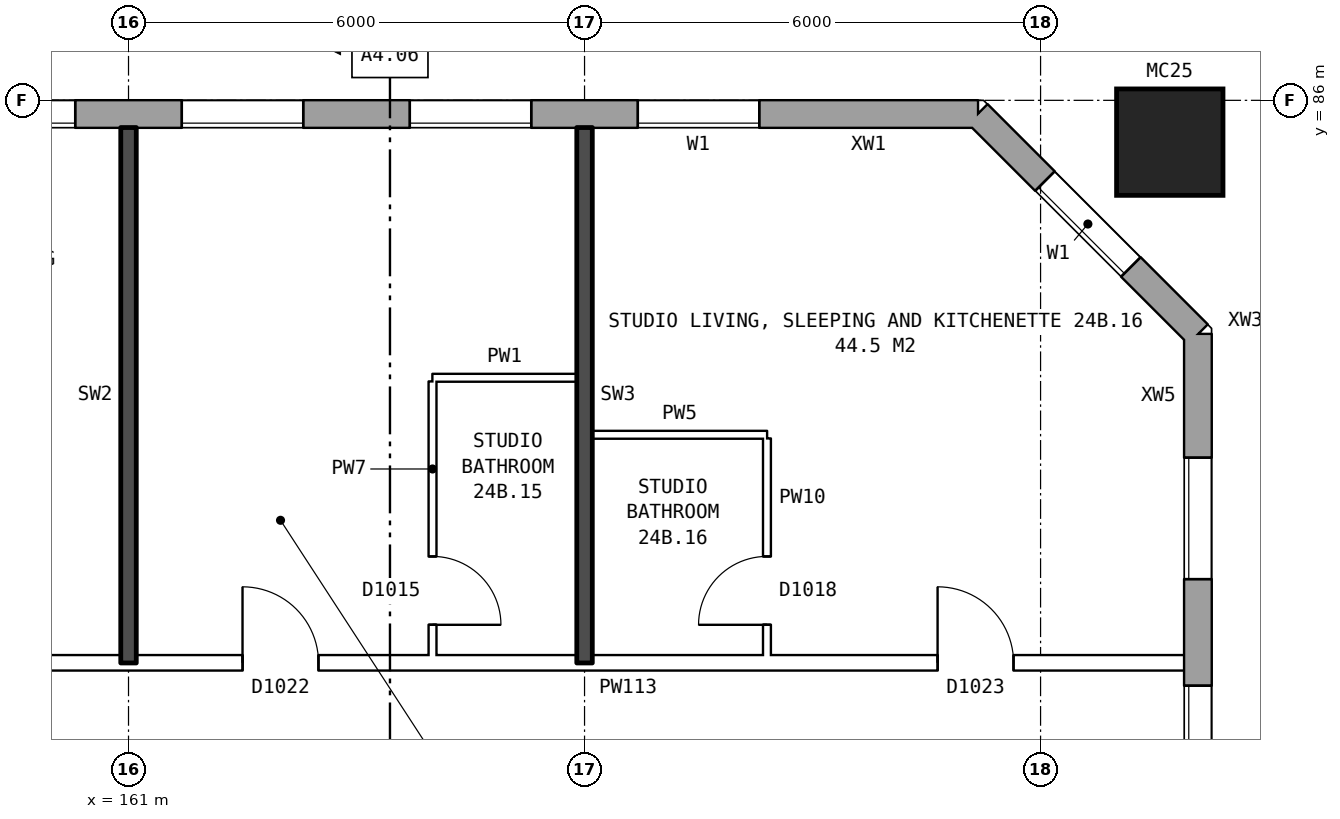
"""IFC4 building model, lengths in metres.
Left out: names, types, materials, properties, quantities, classifications, styles, units other than length and angle.
Written with IfcOpenShell. Run it as: python <this file> out.ifc"""

import sys

from ifc_helpers import new_model, si_unit, direction, frame, frame_2d, origin, origin_2d, place, context, subcontext, project, spatial, rectangle, hollow_rectangle, extrude, element, fill, save


model = new_model("IFC4")
c1 = context("Model", 3, precision=1e-05, world=origin(), true_north=direction((0.0, 1.0)))
c2 = subcontext(c1, "Body", "Model", "MODEL_VIEW")
j1 = project(units=[si_unit("LENGTHUNIT", "METRE"), si_unit("PLANEANGLEUNIT", "RADIAN")], contexts=[c1])
p1 = place(None, origin())
s1 = spatial("IfcSite", under=j1, at=p1, CompositionType="ELEMENT")
p2 = place(p1, origin())
s2 = spatial("IfcBuilding", under=s1, at=p2, CompositionType="ELEMENT")
p3 = place(p2, frame((0.0, 0.0, 87.1)))
s3 = spatial("IfcBuildingStorey", under=s2, at=p3, CompositionType="ELEMENT", Elevation=87.1)
p4 = place(p3, frame((174.7, 85.45, 0.0), z_axis=(0.0, 0.0, 1.0), x_axis=(1.0, 0.0, 0.0)))
e1 = element("IfcColumn", 1, at=p4, inside=s3, PredefinedType="COLUMN", context=c2, shape_type="SweptSolid", body=[
    extrude(hollow_rectangle(XDim=1.4, YDim=1.4, WallThickness=0.075, at=origin_2d()), origin(), (0.0, 0.0, 1.0), 3.1),
])
p5 = place(p3, frame((175.07, 57.075, 0.0), z_axis=(0.0, 0.0, 1.0), x_axis=(0.0, 1.0, 0.0)))
e2 = element("IfcWall", 2, at=p5, inside=s3, PredefinedType="STANDARD", context=c2, shape_type="SweptSolid", body=[
    extrude(rectangle(XDim=25.851, YDim=0.36, at=frame_2d((12.925, 0.0))), origin(), (0.0, 0.0, 1.0), 2.85),
])
p6 = place(p5, frame((1.625, 0.0, 0.8)))
e3 = element("IfcOpeningElement", 3, at=p6, cuts=e2, PredefinedType="OPENING", context=c2, shape_type="SweptSolid", body=[
    extrude(rectangle(XDim=1.6, YDim=1.8, at=frame_2d((0.8, 0.9))), frame((0.0, 0.19, 0.0), z_axis=(0.0, -1.0, 0.0), x_axis=(1.0, 0.0, 0.0)), (0.0, 0.0, 1.0), 0.38),
])
p7 = place(p5, frame((4.625, 0.0, 0.8)))
e4 = element("IfcOpeningElement", 4, at=p7, cuts=e2, PredefinedType="OPENING", context=c2, shape_type="SweptSolid", body=[
    extrude(rectangle(XDim=1.6, YDim=1.8, at=frame_2d((0.8, 0.9))), frame((0.0, 0.19, 0.0), z_axis=(0.0, -1.0, 0.0), x_axis=(1.0, 0.0, 0.0)), (0.0, 0.0, 1.0), 0.38),
])
p8 = place(p5, frame((7.625, 0.0, 0.8)))
e5 = element("IfcOpeningElement", 5, at=p8, cuts=e2, PredefinedType="OPENING", context=c2, shape_type="SweptSolid", body=[
    extrude(rectangle(XDim=1.6, YDim=1.8, at=frame_2d((0.8, 0.9))), frame((0.0, 0.19, 0.0), z_axis=(0.0, -1.0, 0.0), x_axis=(1.0, 0.0, 0.0)), (0.0, 0.0, 1.0), 0.38),
])
p9 = place(p5, frame((10.625, 0.0, 0.8)))
e6 = element("IfcOpeningElement", 6, at=p9, cuts=e2, PredefinedType="OPENING", context=c2, shape_type="SweptSolid", body=[
    extrude(rectangle(XDim=1.6, YDim=1.8, at=frame_2d((0.8, 0.9))), frame((0.0, 0.19, 0.0), z_axis=(0.0, -1.0, 0.0), x_axis=(1.0, 0.0, 0.0)), (0.0, 0.0, 1.0), 0.38),
])
p10 = place(p5, frame((13.625, 0.0, 0.8)))
e7 = element("IfcOpeningElement", 7, at=p10, cuts=e2, PredefinedType="OPENING", context=c2, shape_type="SweptSolid", body=[
    extrude(rectangle(XDim=1.6, YDim=1.8, at=frame_2d((0.8, 0.9))), frame((0.0, 0.19, 0.0), z_axis=(0.0, -1.0, 0.0), x_axis=(1.0, 0.0, 0.0)), (0.0, 0.0, 1.0), 0.38),
])
p11 = place(p5, frame((16.625, 0.0, 0.8)))
e8 = element("IfcOpeningElement", 8, at=p11, cuts=e2, PredefinedType="OPENING", context=c2, shape_type="SweptSolid", body=[
    extrude(rectangle(XDim=1.6, YDim=1.8, at=frame_2d((0.8, 0.9))), frame((0.0, 0.19, 0.0), z_axis=(0.0, -1.0, 0.0), x_axis=(1.0, 0.0, 0.0)), (0.0, 0.0, 1.0), 0.38),
])
p12 = place(p5, frame((19.625, 0.0, 0.8)))
e9 = element("IfcOpeningElement", 9, at=p12, cuts=e2, PredefinedType="OPENING", context=c2, shape_type="SweptSolid", body=[
    extrude(rectangle(XDim=1.6, YDim=1.8, at=frame_2d((0.8, 0.9))), frame((0.0, 0.19, 0.0), z_axis=(0.0, -1.0, 0.0), x_axis=(1.0, 0.0, 0.0)), (0.0, 0.0, 1.0), 0.38),
])
p13 = place(p5, frame((22.625, 0.0, 0.8)))
e10 = element("IfcOpeningElement", 10, at=p13, cuts=e2, PredefinedType="OPENING", context=c2, shape_type="SweptSolid", body=[
    extrude(rectangle(XDim=1.6, YDim=1.8, at=frame_2d((0.8, 0.9))), frame((0.0, 0.19, 0.0), z_axis=(0.0, -1.0, 0.0), x_axis=(1.0, 0.0, 0.0)), (0.0, 0.0, 1.0), 0.38),
])
p14 = place(p3, frame((175.07, 82.925, 0.0), z_axis=(0.0, 0.0, 1.0), x_axis=(-0.707106781187, 0.707106781187, 0.0)))
e11 = element("IfcWall", 11, at=p14, inside=s3, PredefinedType="STANDARD", context=c2, shape_type="SweptSolid", body=[
    extrude(rectangle(XDim=4.094, YDim=0.36, at=frame_2d((2.047, 0.0))), origin(), (0.0, 0.0, 1.0), 2.85),
])
p15 = place(p14, frame((1.247, 0.0, 0.8)))
e12 = element("IfcOpeningElement", 12, at=p15, cuts=e11, PredefinedType="OPENING", context=c2, shape_type="SweptSolid", body=[
    extrude(rectangle(XDim=1.6, YDim=1.8, at=frame_2d((0.8, 0.9))), frame((0.0, 0.19, 0.0), z_axis=(0.0, -1.0, 0.0), x_axis=(1.0, 0.0, 0.0)), (0.0, 0.0, 1.0), 0.38),
])
p16 = place(p3, frame((172.175, 85.82, 0.0), z_axis=(0.0, 0.0, 1.0), x_axis=(-1.0, 0.0, 0.0)))
e13 = element("IfcWall", 13, at=p16, inside=s3, PredefinedType="STANDARD", context=c2, shape_type="SweptSolid", body=[
    extrude(rectangle(XDim=38.101, YDim=0.36, at=frame_2d((19.05, 0.0))), origin(), (0.0, 0.0, 1.0), 2.85),
])
p17 = place(p16, frame((2.875, 0.0, 0.8)))
e14 = element("IfcOpeningElement", 14, at=p17, cuts=e13, PredefinedType="OPENING", context=c2, shape_type="SweptSolid", body=[
    extrude(rectangle(XDim=1.6, YDim=1.8, at=frame_2d((0.8, 0.9))), frame((0.0, 0.19, 0.0), z_axis=(0.0, -1.0, 0.0), x_axis=(1.0, 0.0, 0.0)), (0.0, 0.0, 1.0), 0.38),
])
p18 = place(p16, frame((5.875, 0.0, 0.8)))
e15 = element("IfcOpeningElement", 15, at=p18, cuts=e13, PredefinedType="OPENING", context=c2, shape_type="SweptSolid", body=[
    extrude(rectangle(XDim=1.6, YDim=1.8, at=frame_2d((0.8, 0.9))), frame((0.0, 0.19, 0.0), z_axis=(0.0, -1.0, 0.0), x_axis=(1.0, 0.0, 0.0)), (0.0, 0.0, 1.0), 0.38),
])
p19 = place(p16, frame((8.875, 0.0, 0.8)))
e16 = element("IfcOpeningElement", 16, at=p19, cuts=e13, PredefinedType="OPENING", context=c2, shape_type="SweptSolid", body=[
    extrude(rectangle(XDim=1.6, YDim=1.8, at=frame_2d((0.8, 0.9))), frame((0.0, 0.19, 0.0), z_axis=(0.0, -1.0, 0.0), x_axis=(1.0, 0.0, 0.0)), (0.0, 0.0, 1.0), 0.38),
])
p20 = place(p16, frame((11.875, 0.0, 0.8)))
e17 = element("IfcOpeningElement", 17, at=p20, cuts=e13, PredefinedType="OPENING", context=c2, shape_type="SweptSolid", body=[
    extrude(rectangle(XDim=1.6, YDim=1.8, at=frame_2d((0.8, 0.9))), frame((0.0, 0.19, 0.0), z_axis=(0.0, -1.0, 0.0), x_axis=(1.0, 0.0, 0.0)), (0.0, 0.0, 1.0), 0.38),
])
p21 = place(p16, frame((14.875, 0.0, 0.8)))
e18 = element("IfcOpeningElement", 18, at=p21, cuts=e13, PredefinedType="OPENING", context=c2, shape_type="SweptSolid", body=[
    extrude(rectangle(XDim=1.6, YDim=1.8, at=frame_2d((0.8, 0.9))), frame((0.0, 0.19, 0.0), z_axis=(0.0, -1.0, 0.0), x_axis=(1.0, 0.0, 0.0)), (0.0, 0.0, 1.0), 0.38),
])
p22 = place(p16, frame((18.325, 0.0, 0.15)))
e19 = element("IfcOpeningElement", 19, at=p22, cuts=e13, PredefinedType="OPENING", context=c2, shape_type="SweptSolid", body=[
    extrude(rectangle(XDim=1.4, YDim=1.2, at=frame_2d((0.7, 0.6))), frame((0.0, 0.19, 0.0), z_axis=(0.0, -1.0, 0.0), x_axis=(1.0, 0.0, 0.0)), (0.0, 0.0, 1.0), 0.38),
])
p23 = place(p16, frame((20.625, 0.0, 1.7)))
e20 = element("IfcOpeningElement", 20, at=p23, cuts=e13, PredefinedType="OPENING", context=c2, shape_type="SweptSolid", body=[
    extrude(rectangle(XDim=0.6, YDim=0.9, at=frame_2d((0.3, 0.45))), frame((0.0, 0.19, 0.0), z_axis=(0.0, -1.0, 0.0), x_axis=(1.0, 0.0, 0.0)), (0.0, 0.0, 1.0), 0.38),
])
p24 = place(p16, frame((23.875, 0.0, 0.8)))
e21 = element("IfcOpeningElement", 21, at=p24, cuts=e13, PredefinedType="OPENING", context=c2, shape_type="SweptSolid", body=[
    extrude(rectangle(XDim=1.6, YDim=1.8, at=frame_2d((0.8, 0.9))), frame((0.0, 0.19, 0.0), z_axis=(0.0, -1.0, 0.0), x_axis=(1.0, 0.0, 0.0)), (0.0, 0.0, 1.0), 0.38),
])
p25 = place(p16, frame((26.875, 0.0, 0.8)))
e22 = element("IfcOpeningElement", 22, at=p25, cuts=e13, PredefinedType="OPENING", context=c2, shape_type="SweptSolid", body=[
    extrude(rectangle(XDim=1.6, YDim=1.8, at=frame_2d((0.8, 0.9))), frame((0.0, 0.19, 0.0), z_axis=(0.0, -1.0, 0.0), x_axis=(1.0, 0.0, 0.0)), (0.0, 0.0, 1.0), 0.38),
])
p26 = place(p16, frame((29.875, 0.0, 0.8)))
e23 = element("IfcOpeningElement", 23, at=p26, cuts=e13, PredefinedType="OPENING", context=c2, shape_type="SweptSolid", body=[
    extrude(rectangle(XDim=1.6, YDim=1.8, at=frame_2d((0.8, 0.9))), frame((0.0, 0.19, 0.0), z_axis=(0.0, -1.0, 0.0), x_axis=(1.0, 0.0, 0.0)), (0.0, 0.0, 1.0), 0.38),
])
p27 = place(p16, frame((32.875, 0.0, 0.8)))
e24 = element("IfcOpeningElement", 24, at=p27, cuts=e13, PredefinedType="OPENING", context=c2, shape_type="SweptSolid", body=[
    extrude(rectangle(XDim=1.6, YDim=1.8, at=frame_2d((0.8, 0.9))), frame((0.0, 0.19, 0.0), z_axis=(0.0, -1.0, 0.0), x_axis=(1.0, 0.0, 0.0)), (0.0, 0.0, 1.0), 0.38),
])
p28 = place(p16, frame((35.875, 0.0, 0.8)))
e25 = element("IfcOpeningElement", 25, at=p28, cuts=e13, PredefinedType="OPENING", context=c2, shape_type="SweptSolid", body=[
    extrude(rectangle(XDim=1.6, YDim=1.8, at=frame_2d((0.8, 0.9))), frame((0.0, 0.19, 0.0), z_axis=(0.0, -1.0, 0.0), x_axis=(1.0, 0.0, 0.0)), (0.0, 0.0, 1.0), 0.38),
])
p29 = place(p16, frame((21.525, 0.0, 0.8)))
e26 = element("IfcOpeningElement", 26, at=p29, cuts=e13, PredefinedType="OPENING", context=c2, shape_type="SweptSolid", body=[
    extrude(rectangle(XDim=1.4, YDim=1.8, at=frame_2d((0.7, 0.9))), frame((0.0, 0.19, 0.0), z_axis=(0.0, -1.0, 0.0), x_axis=(1.0, 0.0, 0.0)), (0.0, 0.0, 1.0), 0.38),
])
p30 = place(p3, frame((155.1, 78.6, 0.0), z_axis=(0.0, 0.0, 1.0), x_axis=(1.0, 0.0, 0.0)))
e27 = element("IfcWall", 27, at=p30, inside=s3, PredefinedType="PARTITIONING", context=c2, shape_type="SweptSolid", body=[
    extrude(rectangle(XDim=19.79, YDim=0.2, at=frame_2d((9.895, 0.0))), origin(), (0.0, 0.0, 1.0), 2.85),
])
p31 = place(p30, frame((3.6, 0.0, 0.0)))
e28 = element("IfcOpeningElement", 28, at=p31, cuts=e27, PredefinedType="OPENING", context=c2, shape_type="SweptSolid", body=[
    extrude(rectangle(XDim=1.0, YDim=2.1, at=frame_2d((0.5, 1.05))), frame((0.0, 0.11, 0.0), z_axis=(0.0, -1.0, 0.0), x_axis=(1.0, 0.0, 0.0)), (0.0, 0.0, 1.0), 0.22),
])
p32 = place(p30, frame((7.4, 0.0, 0.0)))
e29 = element("IfcOpeningElement", 29, at=p32, cuts=e27, PredefinedType="OPENING", context=c2, shape_type="SweptSolid", body=[
    extrude(rectangle(XDim=1.0, YDim=2.1, at=frame_2d((0.5, 1.05))), frame((0.0, 0.11, 0.0), z_axis=(0.0, -1.0, 0.0), x_axis=(1.0, 0.0, 0.0)), (0.0, 0.0, 1.0), 0.22),
])
p33 = place(p30, frame((16.545, 0.0, 0.0)))
e30 = element("IfcOpeningElement", 30, at=p33, cuts=e27, PredefinedType="OPENING", context=c2, shape_type="SweptSolid", body=[
    extrude(rectangle(XDim=1.0, YDim=2.1, at=frame_2d((0.5, 1.05))), frame((0.0, 0.11, 0.0), z_axis=(0.0, -1.0, 0.0), x_axis=(1.0, 0.0, 0.0)), (0.0, 0.0, 1.0), 0.22),
])
p34 = place(p3, frame((167.1, 81.6, 0.0), z_axis=(0.0, 0.0, 1.0), x_axis=(1.0, 0.0, 0.0)))
e31 = element("IfcWall", 31, at=p34, inside=s3, PredefinedType="PARTITIONING", context=c2, shape_type="SweptSolid", body=[
    extrude(rectangle(XDim=2.3, YDim=0.1, at=frame_2d((1.15, 0.0))), origin(), (0.0, 0.0, 1.0), 2.85),
])
p35 = place(p3, frame((165.0, 82.35, 0.0), z_axis=(0.0, 0.0, 1.0), x_axis=(1.0, 0.0, 0.0)))
e32 = element("IfcWall", 32, at=p35, inside=s3, PredefinedType="PARTITIONING", context=c2, shape_type="SweptSolid", body=[
    extrude(rectangle(XDim=1.9, YDim=0.1, at=frame_2d((0.95, 0.0))), origin(), (0.0, 0.0, 1.0), 2.85),
])
p36 = place(p3, frame((161.0, 78.6, 0.0), z_axis=(0.0, 0.0, 1.0), x_axis=(0.0, 1.0, 0.0)))
e33 = element("IfcWall", 33, at=p36, inside=s3, PredefinedType="SOLIDWALL", context=c2, shape_type="SweptSolid", body=[
    extrude(rectangle(XDim=7.04, YDim=0.2, at=frame_2d((3.52, 0.0))), origin(), (0.0, 0.0, 1.0), 2.85),
])
p37 = place(p3, frame((165.0, 78.7, 0.0), z_axis=(0.0, 0.0, 1.0), x_axis=(0.0, 1.0, 0.0)))
e34 = element("IfcWall", 34, at=p37, inside=s3, PredefinedType="PARTITIONING", context=c2, shape_type="SweptSolid", body=[
    extrude(rectangle(XDim=3.6, YDim=0.1, at=frame_2d((1.8, 0.0))), origin(), (0.0, 0.0, 1.0), 2.85),
])
p38 = place(p37, frame((0.4, 0.0, 0.0)))
e35 = element("IfcOpeningElement", 35, at=p38, cuts=e34, PredefinedType="OPENING", context=c2, shape_type="SweptSolid", body=[
    extrude(rectangle(XDim=0.9, YDim=2.1, at=frame_2d((0.45, 1.05))), frame((0.0, 0.06, 0.0), z_axis=(0.0, -1.0, 0.0), x_axis=(1.0, 0.0, 0.0)), (0.0, 0.0, 1.0), 0.12),
])
p39 = place(p3, frame((167.0, 78.6, 0.0), z_axis=(0.0, 0.0, 1.0), x_axis=(0.0, 1.0, 0.0)))
e36 = element("IfcWall", 36, at=p39, inside=s3, PredefinedType="SOLIDWALL", context=c2, shape_type="SweptSolid", body=[
    extrude(rectangle(XDim=7.04, YDim=0.2, at=frame_2d((3.52, 0.0))), origin(), (0.0, 0.0, 1.0), 2.85),
])
p40 = place(p3, frame((169.4, 78.7, 0.0), z_axis=(0.0, 0.0, 1.0), x_axis=(0.0, 1.0, 0.0)))
e37 = element("IfcWall", 37, at=p40, inside=s3, PredefinedType="PARTITIONING", context=c2, shape_type="SweptSolid", body=[
    extrude(rectangle(XDim=2.85, YDim=0.1, at=frame_2d((1.425, 0.0))), origin(), (0.0, 0.0, 1.0), 2.85),
])
p41 = place(p40, frame((0.4, 0.0, 0.0)))
e38 = element("IfcOpeningElement", 38, at=p41, cuts=e37, PredefinedType="OPENING", context=c2, shape_type="SweptSolid", body=[
    extrude(rectangle(XDim=0.9, YDim=2.1, at=frame_2d((0.45, 1.05))), frame((0.0, 0.06, 0.0), z_axis=(0.0, -1.0, 0.0), x_axis=(1.0, 0.0, 0.0)), (0.0, 0.0, 1.0), 0.12),
])
p42 = place(p12, origin())
e39 = element("IfcWindow", 39, at=p42, inside=s3, PartitioningType="SINGLE_PANEL", PredefinedType="WINDOW", context=c2, shape_type="SweptSolid", body=[
    extrude(rectangle(XDim=1.6, YDim=1.8, at=frame_2d((0.8, 0.9))), frame((0.0, 0.15, 0.0), z_axis=(0.0, -1.0, 0.0), x_axis=(1.0, 0.0, 0.0)), (0.0, 0.0, 1.0), 0.06),
])
fill(e9, e39)
p43 = place(p13, origin())
e40 = element("IfcWindow", 40, at=p43, inside=s3, PartitioningType="SINGLE_PANEL", PredefinedType="WINDOW", context=c2, shape_type="SweptSolid", body=[
    extrude(rectangle(XDim=1.6, YDim=1.8, at=frame_2d((0.8, 0.9))), frame((0.0, 0.15, 0.0), z_axis=(0.0, -1.0, 0.0), x_axis=(1.0, 0.0, 0.0)), (0.0, 0.0, 1.0), 0.06),
])
fill(e10, e40)
p44 = place(p15, origin())
e41 = element("IfcWindow", 41, at=p44, inside=s3, PartitioningType="SINGLE_PANEL", PredefinedType="WINDOW", context=c2, shape_type="SweptSolid", body=[
    extrude(rectangle(XDim=1.6, YDim=1.8, at=frame_2d((0.8, 0.9))), frame((0.0, 0.15, 0.0), z_axis=(0.0, -1.0, 0.0), x_axis=(1.0, 0.0, 0.0)), (0.0, 0.0, 1.0), 0.06),
])
fill(e12, e41)
p45 = place(p17, origin())
e42 = element("IfcWindow", 42, at=p45, inside=s3, PartitioningType="SINGLE_PANEL", PredefinedType="WINDOW", context=c2, shape_type="SweptSolid", body=[
    extrude(rectangle(XDim=1.6, YDim=1.8, at=frame_2d((0.8, 0.9))), frame((0.0, 0.15, 0.0), z_axis=(0.0, -1.0, 0.0), x_axis=(1.0, 0.0, 0.0)), (0.0, 0.0, 1.0), 0.06),
])
fill(e14, e42)
p46 = place(p18, origin())
e43 = element("IfcWindow", 43, at=p46, inside=s3, PartitioningType="SINGLE_PANEL", PredefinedType="WINDOW", context=c2, shape_type="SweptSolid", body=[
    extrude(rectangle(XDim=1.6, YDim=1.8, at=frame_2d((0.8, 0.9))), frame((0.0, 0.15, 0.0), z_axis=(0.0, -1.0, 0.0), x_axis=(1.0, 0.0, 0.0)), (0.0, 0.0, 1.0), 0.06),
])
fill(e15, e43)
p47 = place(p19, origin())
e44 = element("IfcWindow", 44, at=p47, inside=s3, PartitioningType="SINGLE_PANEL", PredefinedType="WINDOW", context=c2, shape_type="SweptSolid", body=[
    extrude(rectangle(XDim=1.6, YDim=1.8, at=frame_2d((0.8, 0.9))), frame((0.0, 0.15, 0.0), z_axis=(0.0, -1.0, 0.0), x_axis=(1.0, 0.0, 0.0)), (0.0, 0.0, 1.0), 0.06),
])
fill(e16, e44)
p48 = place(p20, origin())
e45 = element("IfcWindow", 45, at=p48, inside=s3, PartitioningType="SINGLE_PANEL", PredefinedType="WINDOW", context=c2, shape_type="SweptSolid", body=[
    extrude(rectangle(XDim=1.6, YDim=1.8, at=frame_2d((0.8, 0.9))), frame((0.0, 0.15, 0.0), z_axis=(0.0, -1.0, 0.0), x_axis=(1.0, 0.0, 0.0)), (0.0, 0.0, 1.0), 0.06),
])
fill(e17, e45)
p49 = place(p32, origin())
e46 = element("IfcDoor", 46, at=p49, inside=s3, OperationType="SINGLE_SWING_LEFT", PredefinedType="DOOR", context=c2, shape_type="SweptSolid", body=[
    extrude(rectangle(XDim=1.0, YDim=2.1, at=frame_2d((0.5, 1.05))), frame((0.0, 0.025, 0.0), z_axis=(0.0, -1.0, 0.0), x_axis=(1.0, 0.0, 0.0)), (0.0, 0.0, 1.0), 0.05),
])
fill(e29, e46)
p50 = place(p38, frame((0.9, 0.0, 0.0), z_axis=(0.0, 0.0, 1.0), x_axis=(-1.0, 0.0, 0.0)))
e47 = element("IfcDoor", 47, at=p50, inside=s3, OperationType="SINGLE_SWING_RIGHT", PredefinedType="DOOR", context=c2, shape_type="SweptSolid", body=[
    extrude(rectangle(XDim=0.9, YDim=2.1, at=frame_2d((0.45, 1.05))), frame((0.0, 0.025, 0.0), z_axis=(0.0, -1.0, 0.0), x_axis=(1.0, 0.0, 0.0)), (0.0, 0.0, 1.0), 0.05),
])
fill(e35, e47)
p51 = place(p33, origin())
e48 = element("IfcDoor", 48, at=p51, inside=s3, OperationType="SINGLE_SWING_LEFT", PredefinedType="DOOR", context=c2, shape_type="SweptSolid", body=[
    extrude(rectangle(XDim=1.0, YDim=2.1, at=frame_2d((0.5, 1.05))), frame((0.0, 0.025, 0.0), z_axis=(0.0, -1.0, 0.0), x_axis=(1.0, 0.0, 0.0)), (0.0, 0.0, 1.0), 0.05),
])
fill(e30, e48)
p52 = place(p41, origin())
e49 = element("IfcDoor", 49, at=p52, inside=s3, OperationType="SINGLE_SWING_LEFT", PredefinedType="DOOR", context=c2, shape_type="SweptSolid", body=[
    extrude(rectangle(XDim=0.9, YDim=2.1, at=frame_2d((0.45, 1.05))), frame((0.0, 0.025, 0.0), z_axis=(0.0, -1.0, 0.0), x_axis=(1.0, 0.0, 0.0)), (0.0, 0.0, 1.0), 0.05),
])
fill(e38, e49)
save(model, sys.argv[1])
